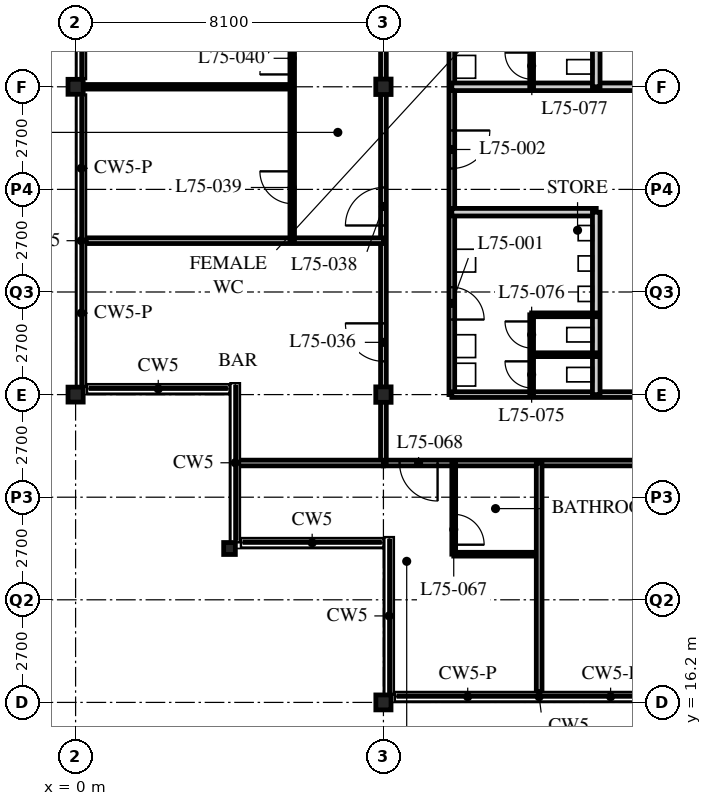
"""IFC4 building model, lengths in metres.
Left out: names, types, materials, properties, quantities, classifications, styles, units other than length and angle.
Written with IfcOpenShell. Run it as: python <this file> out.ifc"""

import sys

from ifc_helpers import new_model, si_unit, direction, frame, frame_2d, origin, origin_2d, place, context, subcontext, project, spatial, rectangle, i_section, extrude, element, fill, save


model = new_model("IFC4")
c1 = context("Model", 3, precision=1e-05, world=origin(), true_north=direction((0.0, 1.0)))
c2 = subcontext(c1, "Body", "Model", "MODEL_VIEW")
j1 = project(units=[si_unit("LENGTHUNIT", "METRE"), si_unit("PLANEANGLEUNIT", "RADIAN")], contexts=[c1])
p1 = place(None, origin())
s1 = spatial("IfcSite", under=j1, at=p1, CompositionType="ELEMENT")
p2 = place(p1, origin())
s2 = spatial("IfcBuilding", under=s1, at=p2, CompositionType="ELEMENT")
p3 = place(p2, frame((0.0, 0.0, 293.1)))
s3 = spatial("IfcBuildingStorey", under=s2, at=p3, CompositionType="ELEMENT", Elevation=293.1)
for number, where, z_axis, x_axis in (
    (1, (0.0, 24.3, 0.0), (0.0, 0.0, 1.0), (1.0, 0.0, 0.0)),
    (2, (0.0, 32.4, 0.0), (0.0, 0.0, 1.0), (1.0, 0.0, 0.0)),
):
    element("IfcColumn", number, at=place(p3, frame(where, z_axis=z_axis, x_axis=x_axis)), inside=s3, PredefinedType="COLUMN", context=c2, shape_type="SweptSolid", body=[
        extrude(i_section(OverallWidth=0.399, OverallDepth=0.394, WebThickness=0.023, FlangeThickness=0.037, FilletRadius=0.015, at=origin_2d()), origin(), (0.0, 0.0, 1.0), 5.4),
    ])
p4 = place(p3, frame((4.05, 20.25, 0.0), z_axis=(0.0, 0.0, 1.0), x_axis=(1.0, 0.0, 0.0)))
e3 = element("IfcColumn", 3, at=p4, inside=s3, PredefinedType="COLUMN", context=c2, shape_type="SweptSolid", body=[
    extrude(i_section(OverallWidth=0.307, OverallDepth=0.314, WebThickness=0.012, FlangeThickness=0.019, FilletRadius=0.015, at=origin_2d()), origin(), (0.0, 0.0, 1.0), 5.4),
])
p5 = place(p3, frame((8.1, 16.2, 0.0), z_axis=(0.0, 0.0, 1.0), x_axis=(1.0, 0.0, 0.0)))
e4 = element("IfcColumn", 4, at=p5, inside=s3, PredefinedType="COLUMN", context=c2, shape_type="SweptSolid", body=[
    extrude(i_section(OverallWidth=0.399, OverallDepth=0.394, WebThickness=0.023, FlangeThickness=0.037, FilletRadius=0.015, at=origin_2d()), origin(), (0.0, 0.0, 1.0), 5.4),
])
for number, where, z_axis, x_axis in (
    (5, (8.1, 24.3, 0.0), (0.0, 0.0, 1.0), (1.0, 0.0, 0.0)),
    (6, (8.1, 32.4, 0.0), (0.0, 0.0, 1.0), (1.0, 0.0, 0.0)),
):
    element("IfcColumn", number, at=place(p3, frame(where, z_axis=z_axis, x_axis=x_axis)), inside=s3, PredefinedType="COLUMN", context=c2, shape_type="SweptSolid", body=[
        extrude(i_section(OverallWidth=0.403, OverallDepth=0.406, WebThickness=0.027, FlangeThickness=0.043, FilletRadius=0.015, at=origin_2d()), origin(), (0.0, 0.0, 1.0), 5.4),
    ])
p6 = place(p3, frame((8.1, 22.5, 0.0), z_axis=(0.0, 0.0, 1.0), x_axis=(1.0, 0.0, 0.0)))
e7 = element("IfcWall", 7, at=p6, inside=s3, PredefinedType="PARTITIONING", context=c2, shape_type="SweptSolid", body=[
    extrude(rectangle(XDim=40.5, YDim=0.15, at=frame_2d((20.25, 0.0))), origin(), (0.0, 0.0, 1.0), 5.19),
])
p7 = place(p6, frame((11.25, 0.0, 0.0)))
e8 = element("IfcOpeningElement", 8, at=p7, cuts=e7, PredefinedType="OPENING", context=c2, shape_type="SweptSolid", body=[
    extrude(rectangle(XDim=1.8, YDim=2.4, at=frame_2d((0.9, 1.2))), frame((0.0, 0.085, 0.0), z_axis=(0.0, -1.0, 0.0), x_axis=(1.0, 0.0, 0.0)), (0.0, 0.0, 1.0), 0.17),
])
p8 = place(p6, frame((23.4, 0.0, 0.0)))
e9 = element("IfcOpeningElement", 9, at=p8, cuts=e7, PredefinedType="OPENING", context=c2, shape_type="SweptSolid", body=[
    extrude(rectangle(XDim=1.8, YDim=2.4, at=frame_2d((0.9, 1.2))), frame((0.0, 0.085, 0.0), z_axis=(0.0, -1.0, 0.0), x_axis=(1.0, 0.0, 0.0)), (0.0, 0.0, 1.0), 0.17),
])
p9 = place(p6, frame((28.75, 0.0, 0.0)))
e10 = element("IfcOpeningElement", 10, at=p9, cuts=e7, PredefinedType="OPENING", context=c2, shape_type="SweptSolid", body=[
    extrude(rectangle(XDim=1.0, YDim=2.1, at=frame_2d((0.5, 1.05))), frame((0.0, 0.085, 0.0), z_axis=(0.0, -1.0, 0.0), x_axis=(1.0, 0.0, 0.0)), (0.0, 0.0, 1.0), 0.17),
])
p10 = place(p6, frame((0.425, 0.0, 0.0)))
e11 = element("IfcOpeningElement", 11, at=p10, cuts=e7, PredefinedType="OPENING", context=c2, shape_type="SweptSolid", body=[
    extrude(rectangle(XDim=1.0, YDim=2.1, at=frame_2d((0.5, 1.05))), frame((0.0, 0.085, 0.0), z_axis=(0.0, -1.0, 0.0), x_axis=(1.0, 0.0, 0.0)), (0.0, 0.0, 1.0), 0.17),
])
p11 = place(p6, frame((39.075, 0.0, 0.0)))
e12 = element("IfcOpeningElement", 12, at=p11, cuts=e7, PredefinedType="OPENING", context=c2, shape_type="SweptSolid", body=[
    extrude(rectangle(XDim=1.0, YDim=2.1, at=frame_2d((0.5, 1.05))), frame((0.0, 0.085, 0.0), z_axis=(0.0, -1.0, 0.0), x_axis=(1.0, 0.0, 0.0)), (0.0, 0.0, 1.0), 0.17),
])
p12 = place(p3, frame((8.1, 22.5, 0.0), z_axis=(0.0, 0.0, 1.0), x_axis=(0.0, 1.0, 0.0)))
e13 = element("IfcWall", 13, at=p12, inside=s3, PredefinedType="PARTITIONING", context=c2, shape_type="SweptSolid", body=[
    extrude(rectangle(XDim=34.238, YDim=0.15, at=frame_2d((17.119, 0.0))), origin(), (0.0, 0.0, 1.0), 4.271),
])
p13 = place(p12, frame((2.675, 0.0, 0.0)))
e14 = element("IfcOpeningElement", 14, at=p13, cuts=e13, PredefinedType="OPENING", context=c2, shape_type="SweptSolid", body=[
    extrude(rectangle(XDim=1.0, YDim=2.1, at=frame_2d((0.5, 1.05))), frame((0.0, 0.085, 0.0), z_axis=(0.0, -1.0, 0.0), x_axis=(1.0, 0.0, 0.0)), (0.0, 0.0, 1.0), 0.17),
])
p14 = place(p12, frame((6.25, 0.0, 0.0)))
e15 = element("IfcOpeningElement", 15, at=p14, cuts=e13, PredefinedType="OPENING", context=c2, shape_type="SweptSolid", body=[
    extrude(rectangle(XDim=1.0, YDim=2.1, at=frame_2d((0.5, 1.05))), frame((0.0, 0.085, 0.0), z_axis=(0.0, -1.0, 0.0), x_axis=(1.0, 0.0, 0.0)), (0.0, 0.0, 1.0), 0.17),
])
p15 = place(p12, frame((14.35, 0.0, 0.0)))
e16 = element("IfcOpeningElement", 16, at=p15, cuts=e13, PredefinedType="OPENING", context=c2, shape_type="SweptSolid", body=[
    extrude(rectangle(XDim=1.0, YDim=2.1, at=frame_2d((0.5, 1.05))), frame((0.0, 0.085, 0.0), z_axis=(0.0, -1.0, 0.0), x_axis=(1.0, 0.0, 0.0)), (0.0, 0.0, 1.0), 0.17),
])
p16 = place(p12, frame((22.45, 0.0, 0.0)))
e17 = element("IfcOpeningElement", 17, at=p16, cuts=e13, PredefinedType="OPENING", context=c2, shape_type="SweptSolid", body=[
    extrude(rectangle(XDim=1.0, YDim=2.1, at=frame_2d((0.5, 1.05))), frame((0.0, 0.085, 0.0), z_axis=(0.0, -1.0, 0.0), x_axis=(1.0, 0.0, 0.0)), (0.0, 0.0, 1.0), 0.17),
])
p17 = place(p12, frame((30.85, 0.0, 0.0)))
e18 = element("IfcOpeningElement", 18, at=p17, cuts=e13, PredefinedType="OPENING", context=c2, shape_type="SweptSolid", body=[
    extrude(rectangle(XDim=1.0, YDim=2.1, at=frame_2d((0.5, 1.05))), frame((0.0, 0.085, 0.0), z_axis=(0.0, -1.0, 0.0), x_axis=(1.0, 0.0, 0.0)), (0.0, 0.0, 1.0), 0.17),
])
p18 = place(p3, frame((9.9, 54.9, 0.0), z_axis=(0.0, 0.0, 1.0), x_axis=(0.0, -1.0, 0.0)))
e19 = element("IfcWall", 19, at=p18, inside=s3, PredefinedType="PARTITIONING", context=c2, shape_type="SweptSolid", body=[
    extrude(rectangle(XDim=30.6, YDim=0.15, at=frame_2d((15.3, 0.0))), origin(), (0.0, 0.0, 1.0), 5.19),
])
p19 = place(p18, frame((27.775, 0.0, 0.0)))
e20 = element("IfcOpeningElement", 20, at=p19, cuts=e19, PredefinedType="OPENING", context=c2, shape_type="SweptSolid", body=[
    extrude(rectangle(XDim=0.85, YDim=2.1, at=frame_2d((0.425, 1.05))), frame((0.0, 0.085, 0.0), z_axis=(0.0, -1.0, 0.0), x_axis=(1.0, 0.0, 0.0)), (0.0, 0.0, 1.0), 0.17),
])
p20 = place(p18, frame((23.65, 0.0, 0.0)))
e21 = element("IfcOpeningElement", 21, at=p20, cuts=e19, PredefinedType="OPENING", context=c2, shape_type="SweptSolid", body=[
    extrude(rectangle(XDim=1.0, YDim=2.1, at=frame_2d((0.5, 1.05))), frame((0.0, 0.085, 0.0), z_axis=(0.0, -1.0, 0.0), x_axis=(1.0, 0.0, 0.0)), (0.0, 0.0, 1.0), 0.17),
])
p21 = place(p18, frame((19.275, 0.0, 0.0)))
e22 = element("IfcOpeningElement", 22, at=p21, cuts=e19, PredefinedType="OPENING", context=c2, shape_type="SweptSolid", body=[
    extrude(rectangle(XDim=0.85, YDim=2.1, at=frame_2d((0.425, 1.05))), frame((0.0, 0.085, 0.0), z_axis=(0.0, -1.0, 0.0), x_axis=(1.0, 0.0, 0.0)), (0.0, 0.0, 1.0), 0.17),
])
p22 = place(p18, frame((15.15, 0.0, 0.0)))
e23 = element("IfcOpeningElement", 23, at=p22, cuts=e19, PredefinedType="OPENING", context=c2, shape_type="SweptSolid", body=[
    extrude(rectangle(XDim=1.0, YDim=2.1, at=frame_2d((0.5, 1.05))), frame((0.0, 0.085, 0.0), z_axis=(0.0, -1.0, 0.0), x_axis=(1.0, 0.0, 0.0)), (0.0, 0.0, 1.0), 0.17),
])
p23 = place(p3, frame((9.9, 24.3, 0.0), z_axis=(0.0, 0.0, 1.0), x_axis=(1.0, 0.0, 0.0)))
e24 = element("IfcWall", 24, at=p23, inside=s3, PredefinedType="PARTITIONING", context=c2, shape_type="SweptSolid", body=[
    extrude(rectangle(XDim=6.1, YDim=0.15, at=frame_2d((3.05, 0.0))), origin(), (0.0, 0.0, 1.0), 4.271),
])
p24 = place(p3, frame((9.9, 32.4, 0.0), z_axis=(0.0, 0.0, 1.0), x_axis=(1.0, 0.0, 0.0)))
e25 = element("IfcWall", 25, at=p24, inside=s3, PredefinedType="SOLIDWALL", context=c2, shape_type="SweptSolid", body=[
    extrude(rectangle(XDim=6.3, YDim=0.2, at=frame_2d((3.15, 0.0))), origin(), (0.0, 0.0, 1.0), 4.271),
])
p25 = place(p3, frame((9.9, 29.1, 0.0), z_axis=(0.0, 0.0, 1.0), x_axis=(1.0, 0.0, 0.0)))
e26 = element("IfcWall", 26, at=p25, inside=s3, PredefinedType="SOLIDWALL", context=c2, shape_type="SweptSolid", body=[
    extrude(rectangle(XDim=3.8, YDim=0.2, at=frame_2d((1.9, 0.0))), origin(), (0.0, 0.0, 1.0), 5.19),
])
p26 = place(p3, frame((13.7, 24.3, 0.0), z_axis=(0.0, 0.0, 1.0), x_axis=(0.0, 1.0, 0.0)))
e27 = element("IfcWall", 27, at=p26, inside=s3, PredefinedType="SOLIDWALL", context=c2, shape_type="SweptSolid", body=[
    extrude(rectangle(XDim=4.8, YDim=0.2, at=frame_2d((2.4, 0.0))), origin(), (0.0, 0.0, 1.0), 5.19),
])
p27 = place(p3, frame((13.7, 32.4, 0.0), z_axis=(0.0, 0.0, 1.0), x_axis=(0.0, 1.0, 0.0)))
e28 = element("IfcWall", 28, at=p27, inside=s3, PredefinedType="SOLIDWALL", context=c2, shape_type="SweptSolid", body=[
    extrude(rectangle(XDim=5.6, YDim=0.2, at=frame_2d((2.8, 0.0))), origin(), (0.0, 0.0, 1.0), 5.19),
])
p28 = place(p3, frame((8.1, 28.35, 0.0), z_axis=(0.0, 0.0, 1.0), x_axis=(-1.0, 0.0, 0.0)))
e29 = element("IfcWall", 29, at=p28, inside=s3, PredefinedType="PARTITIONING", context=c2, shape_type="SweptSolid", body=[
    extrude(rectangle(XDim=7.822, YDim=0.15, at=frame_2d((3.911, 0.0))), origin(), (0.0, 0.0, 1.0), 5.19),
])
p29 = place(p3, frame((5.7, 28.35, 0.0), z_axis=(0.0, 0.0, 1.0), x_axis=(0.0, 1.0, 0.0)))
e30 = element("IfcWall", 30, at=p29, inside=s3, PredefinedType="PARTITIONING", context=c2, shape_type="SweptSolid", body=[
    extrude(rectangle(XDim=24.251, YDim=0.12, at=frame_2d((12.125, 0.0))), origin(), (0.0, 0.0, 1.0), 5.19),
])
p30 = place(p29, frame((0.975, 0.0, 0.0)))
e31 = element("IfcOpeningElement", 31, at=p30, cuts=e30, PredefinedType="OPENING", context=c2, shape_type="SweptSolid", body=[
    extrude(rectangle(XDim=0.85, YDim=2.1, at=frame_2d((0.425, 1.05))), frame((0.0, 0.07, 0.0), z_axis=(0.0, -1.0, 0.0), x_axis=(1.0, 0.0, 0.0)), (0.0, 0.0, 1.0), 0.14),
])
p31 = place(p29, frame((4.375, 0.0, 0.0)))
e32 = element("IfcOpeningElement", 32, at=p31, cuts=e30, PredefinedType="OPENING", context=c2, shape_type="SweptSolid", body=[
    extrude(rectangle(XDim=0.85, YDim=2.1, at=frame_2d((0.425, 1.05))), frame((0.0, 0.07, 0.0), z_axis=(0.0, -1.0, 0.0), x_axis=(1.0, 0.0, 0.0)), (0.0, 0.0, 1.0), 0.14),
])
p32 = place(p29, frame((9.075, 0.0, 0.0)))
e33 = element("IfcOpeningElement", 33, at=p32, cuts=e30, PredefinedType="OPENING", context=c2, shape_type="SweptSolid", body=[
    extrude(rectangle(XDim=0.85, YDim=2.1, at=frame_2d((0.425, 1.05))), frame((0.0, 0.07, 0.0), z_axis=(0.0, -1.0, 0.0), x_axis=(1.0, 0.0, 0.0)), (0.0, 0.0, 1.0), 0.14),
])
p33 = place(p29, frame((12.475, 0.0, 0.0)))
e34 = element("IfcOpeningElement", 34, at=p33, cuts=e30, PredefinedType="OPENING", context=c2, shape_type="SweptSolid", body=[
    extrude(rectangle(XDim=0.85, YDim=2.1, at=frame_2d((0.425, 1.05))), frame((0.0, 0.07, 0.0), z_axis=(0.0, -1.0, 0.0), x_axis=(1.0, 0.0, 0.0)), (0.0, 0.0, 1.0), 0.14),
])
p34 = place(p29, frame((17.175, 0.0, 0.0)))
e35 = element("IfcOpeningElement", 35, at=p34, cuts=e30, PredefinedType="OPENING", context=c2, shape_type="SweptSolid", body=[
    extrude(rectangle(XDim=0.85, YDim=2.1, at=frame_2d((0.425, 1.05))), frame((0.0, 0.07, 0.0), z_axis=(0.0, -1.0, 0.0), x_axis=(1.0, 0.0, 0.0)), (0.0, 0.0, 1.0), 0.14),
])
p35 = place(p29, frame((20.575, 0.0, 0.0)))
e36 = element("IfcOpeningElement", 36, at=p35, cuts=e30, PredefinedType="OPENING", context=c2, shape_type="SweptSolid", body=[
    extrude(rectangle(XDim=0.85, YDim=2.1, at=frame_2d((0.425, 1.05))), frame((0.0, 0.07, 0.0), z_axis=(0.0, -1.0, 0.0), x_axis=(1.0, 0.0, 0.0)), (0.0, 0.0, 1.0), 0.14),
])
p36 = place(p3, frame((5.7, 32.4, 0.0), z_axis=(0.0, 0.0, 1.0), x_axis=(-1.0, 0.0, 0.0)))
e37 = element("IfcWall", 37, at=p36, inside=s3, PredefinedType="PARTITIONING", context=c2, shape_type="SweptSolid", body=[
    extrude(rectangle(XDim=5.4, YDim=0.12, at=frame_2d((2.7, 0.0))), origin(), (0.0, 0.0, 1.0), 4.271),
])
p37 = place(p3, frame((9.95, 20.1, 0.0), z_axis=(0.0, 0.0, 1.0), x_axis=(1.0, 0.0, 0.0)))
e38 = element("IfcWall", 38, at=p37, inside=s3, PredefinedType="PARTITIONING", context=c2, shape_type="SweptSolid", body=[
    extrude(rectangle(XDim=2.248, YDim=0.1, at=frame_2d((1.124, 0.0))), origin(), (0.0, 0.0, 1.0), 5.19),
])
p38 = place(p3, frame((9.95, 22.5, 0.0), z_axis=(0.0, 0.0, 1.0), x_axis=(0.0, -1.0, 0.0)))
e39 = element("IfcWall", 39, at=p38, inside=s3, PredefinedType="PARTITIONING", context=c2, shape_type="SweptSolid", body=[
    extrude(rectangle(XDim=2.4, YDim=0.1, at=frame_2d((1.2, 0.0))), origin(), (0.0, 0.0, 1.0), 5.19),
])
p39 = place(p38, frame((1.35, 0.0, 0.0)))
e40 = element("IfcOpeningElement", 40, at=p39, cuts=e39, PredefinedType="OPENING", context=c2, shape_type="SweptSolid", body=[
    extrude(rectangle(XDim=0.8, YDim=2.1, at=frame_2d((0.4, 1.05))), frame((0.0, 0.06, 0.0), z_axis=(0.0, -1.0, 0.0), x_axis=(1.0, 0.0, 0.0)), (0.0, 0.0, 1.0), 0.12),
])
p40 = place(p3, frame((4.221, 22.5, 0.0), z_axis=(0.0, 0.0, 1.0), x_axis=(1.0, 0.0, 0.0)))
e41 = element("IfcWall", 41, at=p40, inside=s3, PredefinedType="PARTITIONING", context=c2, shape_type="SweptSolid", body=[
    extrude(rectangle(XDim=3.879, YDim=0.15, at=frame_2d((1.939, 0.0))), origin(), (0.0, 0.0, 1.0), 5.19),
])
p41 = place(p3, frame((12.198, 22.5, 0.0), z_axis=(0.0, 0.0, 1.0), x_axis=(0.0, -1.0, 0.0)))
e42 = element("IfcWall", 42, at=p41, inside=s3, PredefinedType="PARTITIONING", context=c2, shape_type="SweptSolid", body=[
    extrude(rectangle(XDim=6.022, YDim=0.15, at=frame_2d((3.011, 0.0))), origin(), (0.0, 0.0, 1.0), 5.19),
])
p42 = place(p3, frame((12.0, 24.3, 0.0), z_axis=(0.0, 0.0, 1.0), x_axis=(0.0, 1.0, 0.0)))
e43 = element("IfcWall", 43, at=p42, inside=s3, PredefinedType="PARTITIONING", context=c2, shape_type="SweptSolid", body=[
    extrude(rectangle(XDim=2.1, YDim=0.1, at=frame_2d((1.05, 0.0))), origin(), (0.0, 0.0, 1.0), 5.19),
])
p43 = place(p42, frame((0.175, 0.0, 0.0)))
e44 = element("IfcOpeningElement", 44, at=p43, cuts=e43, PredefinedType="OPENING", context=c2, shape_type="SweptSolid", body=[
    extrude(rectangle(XDim=0.7, YDim=2.0, at=frame_2d((0.35, 1.0))), frame((0.0, 0.06, 0.0), z_axis=(0.0, -1.0, 0.0), x_axis=(1.0, 0.0, 0.0)), (0.0, 0.0, 1.0), 0.12),
])
p44 = place(p42, frame((1.225, 0.0, 0.0)))
e45 = element("IfcOpeningElement", 45, at=p44, cuts=e43, PredefinedType="OPENING", context=c2, shape_type="SweptSolid", body=[
    extrude(rectangle(XDim=0.7, YDim=2.0, at=frame_2d((0.35, 1.0))), frame((0.0, 0.06, 0.0), z_axis=(0.0, -1.0, 0.0), x_axis=(1.0, 0.0, 0.0)), (0.0, 0.0, 1.0), 0.12),
])
for number, where, z_axis, x_axis in (
    (46, (12.0, 25.35, 0.0), (0.0, 0.0, 1.0), (1.0, 0.0, 0.0)),
    (47, (12.0, 26.4, 0.0), (0.0, 0.0, 1.0), (1.0, 0.0, 0.0)),
):
    element("IfcWall", number, at=place(p3, frame(where, z_axis=z_axis, x_axis=x_axis)), inside=s3, PredefinedType="PARTITIONING", context=c2, shape_type="SweptSolid", body=[
        extrude(rectangle(XDim=1.7, YDim=0.1, at=frame_2d((0.85, 0.0))), origin(), (0.0, 0.0, 1.0), 5.19),
    ])
p45 = place(p3, frame((12.0, 32.4, 0.0), z_axis=(0.0, 0.0, 1.0), x_axis=(0.0, 1.0, 0.0)))
e48 = element("IfcWall", 48, at=p45, inside=s3, PredefinedType="PARTITIONING", context=c2, shape_type="SweptSolid", body=[
    extrude(rectangle(XDim=5.25, YDim=0.1, at=frame_2d((2.625, 0.0))), origin(), (0.0, 0.0, 1.0), 5.19),
])
p46 = place(p45, frame((0.2, 0.0, 0.0)))
e49 = element("IfcOpeningElement", 49, at=p46, cuts=e48, PredefinedType="OPENING", context=c2, shape_type="SweptSolid", body=[
    extrude(rectangle(XDim=0.7, YDim=2.0, at=frame_2d((0.35, 1.0))), frame((0.0, 0.06, 0.0), z_axis=(0.0, -1.0, 0.0), x_axis=(1.0, 0.0, 0.0)), (0.0, 0.0, 1.0), 0.12),
])
p47 = place(p45, frame((1.225, 0.0, 0.0)))
e50 = element("IfcOpeningElement", 50, at=p47, cuts=e48, PredefinedType="OPENING", context=c2, shape_type="SweptSolid", body=[
    extrude(rectangle(XDim=0.7, YDim=2.0, at=frame_2d((0.35, 1.0))), frame((0.0, 0.06, 0.0), z_axis=(0.0, -1.0, 0.0), x_axis=(1.0, 0.0, 0.0)), (0.0, 0.0, 1.0), 0.12),
])
p48 = place(p45, frame((2.275, 0.0, 0.0)))
e51 = element("IfcOpeningElement", 51, at=p48, cuts=e48, PredefinedType="OPENING", context=c2, shape_type="SweptSolid", body=[
    extrude(rectangle(XDim=0.7, YDim=2.0, at=frame_2d((0.35, 1.0))), frame((0.0, 0.06, 0.0), z_axis=(0.0, -1.0, 0.0), x_axis=(1.0, 0.0, 0.0)), (0.0, 0.0, 1.0), 0.12),
])
p49 = place(p45, frame((3.325, 0.0, 0.0)))
e52 = element("IfcOpeningElement", 52, at=p49, cuts=e48, PredefinedType="OPENING", context=c2, shape_type="SweptSolid", body=[
    extrude(rectangle(XDim=0.7, YDim=2.0, at=frame_2d((0.35, 1.0))), frame((0.0, 0.06, 0.0), z_axis=(0.0, -1.0, 0.0), x_axis=(1.0, 0.0, 0.0)), (0.0, 0.0, 1.0), 0.12),
])
p50 = place(p45, frame((4.375, 0.0, 0.0)))
e53 = element("IfcOpeningElement", 53, at=p50, cuts=e48, PredefinedType="OPENING", context=c2, shape_type="SweptSolid", body=[
    extrude(rectangle(XDim=0.7, YDim=2.0, at=frame_2d((0.35, 1.0))), frame((0.0, 0.06, 0.0), z_axis=(0.0, -1.0, 0.0), x_axis=(1.0, 0.0, 0.0)), (0.0, 0.0, 1.0), 0.12),
])
p51 = place(p19, origin())
e54 = element("IfcDoor", 54, at=p51, inside=s3, OperationType="SINGLE_SWING_RIGHT", PredefinedType="DOOR", context=c2, shape_type="SweptSolid", body=[
    extrude(rectangle(XDim=0.85, YDim=2.1, at=frame_2d((0.425, 1.05))), frame((0.0, 0.025, 0.0), z_axis=(0.0, -1.0, 0.0), x_axis=(1.0, 0.0, 0.0)), (0.0, 0.0, 1.0), 0.05),
])
fill(e20, e54)
p52 = place(p20, origin())
e55 = element("IfcDoor", 55, at=p52, inside=s3, OperationType="SINGLE_SWING_LEFT", PredefinedType="DOOR", context=c2, shape_type="SweptSolid", body=[
    extrude(rectangle(XDim=1.0, YDim=2.1, at=frame_2d((0.5, 1.05))), frame((0.0, 0.025, 0.0), z_axis=(0.0, -1.0, 0.0), x_axis=(1.0, 0.0, 0.0)), (0.0, 0.0, 1.0), 0.05),
])
fill(e21, e55)
p53 = place(p13, origin())
e56 = element("IfcDoor", 56, at=p53, inside=s3, OperationType="SINGLE_SWING_RIGHT", PredefinedType="DOOR", context=c2, shape_type="SweptSolid", body=[
    extrude(rectangle(XDim=1.0, YDim=2.1, at=frame_2d((0.5, 1.05))), frame((0.0, 0.025, 0.0), z_axis=(0.0, -1.0, 0.0), x_axis=(1.0, 0.0, 0.0)), (0.0, 0.0, 1.0), 0.05),
])
fill(e14, e56)
p54 = place(p14, origin())
e57 = element("IfcDoor", 57, at=p54, inside=s3, OperationType="SINGLE_SWING_LEFT", PredefinedType="DOOR", context=c2, shape_type="SweptSolid", body=[
    extrude(rectangle(XDim=1.0, YDim=2.1, at=frame_2d((0.5, 1.05))), frame((0.0, 0.025, 0.0), z_axis=(0.0, -1.0, 0.0), x_axis=(1.0, 0.0, 0.0)), (0.0, 0.0, 1.0), 0.05),
])
fill(e15, e57)
p55 = place(p30, origin())
e58 = element("IfcDoor", 58, at=p55, inside=s3, OperationType="SINGLE_SWING_RIGHT", PredefinedType="DOOR", context=c2, shape_type="SweptSolid", body=[
    extrude(rectangle(XDim=0.85, YDim=2.1, at=frame_2d((0.425, 1.05))), frame((0.0, 0.025, 0.0), z_axis=(0.0, -1.0, 0.0), x_axis=(1.0, 0.0, 0.0)), (0.0, 0.0, 1.0), 0.05),
])
fill(e31, e58)
p56 = place(p31, origin())
e59 = element("IfcDoor", 59, at=p56, inside=s3, OperationType="SINGLE_SWING_LEFT", PredefinedType="DOOR", context=c2, shape_type="SweptSolid", body=[
    extrude(rectangle(XDim=0.85, YDim=2.1, at=frame_2d((0.425, 1.05))), frame((0.0, 0.025, 0.0), z_axis=(0.0, -1.0, 0.0), x_axis=(1.0, 0.0, 0.0)), (0.0, 0.0, 1.0), 0.05),
])
fill(e32, e59)
p57 = place(p39, origin())
e60 = element("IfcDoor", 60, at=p57, inside=s3, OperationType="SINGLE_SWING_RIGHT", PredefinedType="DOOR", context=c2, shape_type="SweptSolid", body=[
    extrude(rectangle(XDim=0.8, YDim=2.1, at=frame_2d((0.4, 1.05))), frame((0.0, 0.025, 0.0), z_axis=(0.0, -1.0, 0.0), x_axis=(1.0, 0.0, 0.0)), (0.0, 0.0, 1.0), 0.05),
])
fill(e40, e60)
p58 = place(p10, origin())
e61 = element("IfcDoor", 61, at=p58, inside=s3, OperationType="SINGLE_SWING_LEFT", PredefinedType="DOOR", context=c2, shape_type="SweptSolid", body=[
    extrude(rectangle(XDim=1.0, YDim=2.1, at=frame_2d((0.5, 1.05))), frame((0.0, 0.025, 0.0), z_axis=(0.0, -1.0, 0.0), x_axis=(1.0, 0.0, 0.0)), (0.0, 0.0, 1.0), 0.05),
])
fill(e11, e61)
p59 = place(p43, origin())
e62 = element("IfcDoor", 62, at=p59, inside=s3, OperationType="SINGLE_SWING_RIGHT", PredefinedType="DOOR", context=c2, shape_type="SweptSolid", body=[
    extrude(rectangle(XDim=0.7, YDim=2.0, at=frame_2d((0.35, 1.0))), frame((0.0, 0.025, 0.0), z_axis=(0.0, -1.0, 0.0), x_axis=(1.0, 0.0, 0.0)), (0.0, 0.0, 1.0), 0.05),
])
fill(e44, e62)
p60 = place(p44, origin())
e63 = element("IfcDoor", 63, at=p60, inside=s3, OperationType="SINGLE_SWING_RIGHT", PredefinedType="DOOR", context=c2, shape_type="SweptSolid", body=[
    extrude(rectangle(XDim=0.7, YDim=2.0, at=frame_2d((0.35, 1.0))), frame((0.0, 0.025, 0.0), z_axis=(0.0, -1.0, 0.0), x_axis=(1.0, 0.0, 0.0)), (0.0, 0.0, 1.0), 0.05),
])
fill(e45, e63)
p61 = place(p46, origin())
e64 = element("IfcDoor", 64, at=p61, inside=s3, OperationType="SINGLE_SWING_RIGHT", PredefinedType="DOOR", context=c2, shape_type="SweptSolid", body=[
    extrude(rectangle(XDim=0.7, YDim=2.0, at=frame_2d((0.35, 1.0))), frame((0.0, 0.025, 0.0), z_axis=(0.0, -1.0, 0.0), x_axis=(1.0, 0.0, 0.0)), (0.0, 0.0, 1.0), 0.05),
])
fill(e49, e64)
save(model, sys.argv[1])
